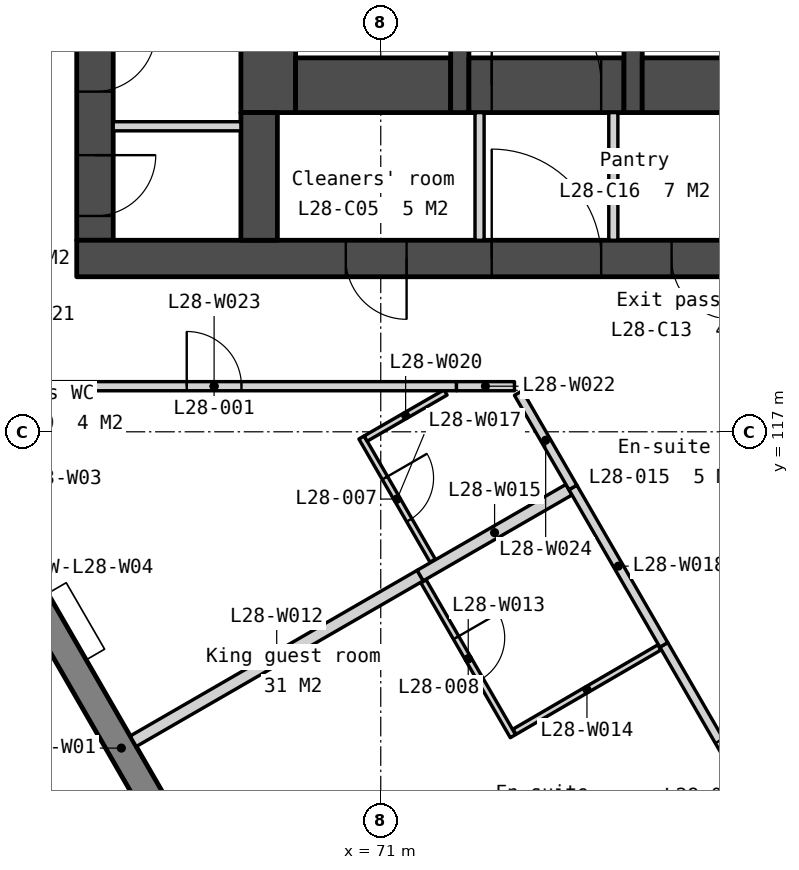
"""IFC4 building model, lengths in metres.
Left out: names, types, materials, properties, quantities, classifications, styles, units other than length and angle.
Written with IfcOpenShell. Run it as: python <this file> out.ifc"""

import sys

from ifc_helpers import new_model, si_unit, direction, frame, frame_2d, origin, place, context, subcontext, project, spatial, polyline, rectangle, outline, extrude, element, fill, save


model = new_model("IFC4")
c1 = context("Model", 3, precision=1e-05, world=origin(), true_north=direction((0.0, 1.0)))
c2 = subcontext(c1, "Body", "Model", "MODEL_VIEW")
j1 = project(units=[si_unit("LENGTHUNIT", "METRE"), si_unit("PLANEANGLEUNIT", "RADIAN")], contexts=[c1])
p1 = place(None, origin())
s1 = spatial("IfcSite", under=j1, at=p1, CompositionType="ELEMENT")
p2 = place(p1, origin())
s2 = spatial("IfcBuilding", under=s1, at=p2, CompositionType="ELEMENT")
p3 = place(p2, frame((0.0, 0.0, 113.3)))
s3 = spatial("IfcBuildingStorey", under=s2, at=p3, CompositionType="ELEMENT", Elevation=113.3)
p4 = place(p3, frame((66.3, 133.95, 0.0), z_axis=(0.0, 0.0, 1.0), x_axis=(0.0, -1.0, 0.0)))
e1 = element("IfcWall", 1, at=p4, inside=s3, PredefinedType="SOLIDWALL", context=c2, shape_type="SweptSolid", body=[
    extrude(rectangle(XDim=13.8, YDim=0.6, at=frame_2d((6.9, 0.0))), origin(), (0.0, 0.0, 1.0), 3.35),
])
p5 = place(p4, frame((0.6, 0.0, 0.0)))
e2 = element("IfcOpeningElement", 2, at=p5, cuts=e1, PredefinedType="OPENING", context=c2, shape_type="SweptSolid", body=[
    extrude(rectangle(XDim=1.1, YDim=2.1, at=frame_2d((0.55, 1.05))), frame((0.0, 0.31, 0.0), z_axis=(0.0, -1.0, 0.0), x_axis=(1.0, 0.0, 0.0)), (0.0, 0.0, 1.0), 0.62),
])
p6 = place(p4, frame((8.405, 0.0, 0.0)))
e3 = element("IfcOpeningElement", 3, at=p6, cuts=e1, PredefinedType="OPENING", context=c2, shape_type="SweptSolid", body=[
    extrude(rectangle(XDim=1.0, YDim=2.1, at=frame_2d((0.5, 1.05))), frame((0.0, 0.31, 0.0), z_axis=(0.0, -1.0, 0.0), x_axis=(1.0, 0.0, 0.0)), (0.0, 0.0, 1.0), 0.62),
])
p7 = place(p4, frame((10.355, 0.0, 0.0)))
e4 = element("IfcOpeningElement", 4, at=p7, cuts=e1, PredefinedType="OPENING", context=c2, shape_type="SweptSolid", body=[
    extrude(rectangle(XDim=1.0, YDim=2.1, at=frame_2d((0.5, 1.05))), frame((0.0, 0.31, 0.0), z_axis=(0.0, -1.0, 0.0), x_axis=(1.0, 0.0, 0.0)), (0.0, 0.0, 1.0), 0.62),
])
p8 = place(p4, frame((12.4, 0.0, 0.0)))
e5 = element("IfcOpeningElement", 5, at=p8, cuts=e1, PredefinedType="OPENING", context=c2, shape_type="SweptSolid", body=[
    extrude(rectangle(XDim=1.0, YDim=2.1, at=frame_2d((0.5, 1.05))), frame((0.0, 0.31, 0.0), z_axis=(0.0, -1.0, 0.0), x_axis=(1.0, 0.0, 0.0)), (0.0, 0.0, 1.0), 0.62),
])
p9 = place(p3, frame((66.0, 119.85, 0.0), z_axis=(0.0, 0.0, 1.0), x_axis=(1.0, 0.0, 0.0)))
e6 = element("IfcWall", 6, at=p9, inside=s3, PredefinedType="SOLIDWALL", context=c2, shape_type="SweptSolid", body=[
    extrude(rectangle(XDim=28.0, YDim=0.6, at=frame_2d((14.0, 0.0))), origin(), (0.0, 0.0, 1.0), 3.35),
])
p10 = place(p9, frame((6.825, 0.0, 0.0)))
e7 = element("IfcOpeningElement", 7, at=p10, cuts=e6, PredefinedType="OPENING", context=c2, shape_type="SweptSolid", body=[
    extrude(rectangle(XDim=1.8, YDim=2.1, at=frame_2d((0.9, 1.05))), frame((0.0, 0.31, 0.0), z_axis=(0.0, -1.0, 0.0), x_axis=(1.0, 0.0, 0.0)), (0.0, 0.0, 1.0), 0.62),
])
p11 = place(p9, frame((15.85, 0.0, 0.0)))
e8 = element("IfcOpeningElement", 8, at=p11, cuts=e6, PredefinedType="OPENING", context=c2, shape_type="SweptSolid", body=[
    extrude(rectangle(XDim=1.5, YDim=2.1, at=frame_2d((0.75, 1.05))), frame((0.0, 0.31, 0.0), z_axis=(0.0, -1.0, 0.0), x_axis=(1.0, 0.0, 0.0)), (0.0, 0.0, 1.0), 0.62),
])
p12 = place(p9, frame((19.375, 0.0, 0.0)))
e9 = element("IfcOpeningElement", 9, at=p12, cuts=e6, PredefinedType="OPENING", context=c2, shape_type="SweptSolid", body=[
    extrude(rectangle(XDim=1.8, YDim=2.1, at=frame_2d((0.9, 1.05))), frame((0.0, 0.31, 0.0), z_axis=(0.0, -1.0, 0.0), x_axis=(1.0, 0.0, 0.0)), (0.0, 0.0, 1.0), 0.62),
])
p13 = place(p9, frame((4.425, 0.0, 0.0)))
e10 = element("IfcOpeningElement", 10, at=p13, cuts=e6, PredefinedType="OPENING", context=c2, shape_type="SweptSolid", body=[
    extrude(rectangle(XDim=1.0, YDim=2.1, at=frame_2d((0.5, 1.05))), frame((0.0, 0.31, 0.0), z_axis=(0.0, -1.0, 0.0), x_axis=(1.0, 0.0, 0.0)), (0.0, 0.0, 1.0), 0.62),
])
p14 = place(p9, frame((9.783, 0.0, 0.0)))
e11 = element("IfcOpeningElement", 11, at=p14, cuts=e6, PredefinedType="OPENING", context=c2, shape_type="SweptSolid", body=[
    extrude(rectangle(XDim=1.0, YDim=2.1, at=frame_2d((0.5, 1.05))), frame((0.0, 0.31, 0.0), z_axis=(0.0, -1.0, 0.0), x_axis=(1.0, 0.0, 0.0)), (0.0, 0.0, 1.0), 0.62),
])
p15 = place(p9, frame((11.525, 0.0, 0.0)))
e12 = element("IfcOpeningElement", 12, at=p15, cuts=e6, PredefinedType="OPENING", context=c2, shape_type="SweptSolid", body=[
    extrude(rectangle(XDim=1.0, YDim=2.1, at=frame_2d((0.5, 1.05))), frame((0.0, 0.31, 0.0), z_axis=(0.0, -1.0, 0.0), x_axis=(1.0, 0.0, 0.0)), (0.0, 0.0, 1.0), 0.62),
])
p16 = place(p9, frame((13.658, 0.0, 0.0)))
e13 = element("IfcOpeningElement", 13, at=p16, cuts=e6, PredefinedType="OPENING", context=c2, shape_type="SweptSolid", body=[
    extrude(rectangle(XDim=1.0, YDim=2.1, at=frame_2d((0.5, 1.05))), frame((0.0, 0.31, 0.0), z_axis=(0.0, -1.0, 0.0), x_axis=(1.0, 0.0, 0.0)), (0.0, 0.0, 1.0), 0.62),
])
p17 = place(p9, frame((21.725, 0.0, 0.0)))
e14 = element("IfcOpeningElement", 14, at=p17, cuts=e6, PredefinedType="OPENING", context=c2, shape_type="SweptSolid", body=[
    extrude(rectangle(XDim=1.0, YDim=2.1, at=frame_2d((0.5, 1.05))), frame((0.0, 0.31, 0.0), z_axis=(0.0, -1.0, 0.0), x_axis=(1.0, 0.0, 0.0)), (0.0, 0.0, 1.0), 0.62),
])
p18 = place(p9, frame((23.425, 0.0, 0.0)))
e15 = element("IfcOpeningElement", 15, at=p18, cuts=e6, PredefinedType="OPENING", context=c2, shape_type="SweptSolid", body=[
    extrude(rectangle(XDim=1.0, YDim=2.1, at=frame_2d((0.5, 1.05))), frame((0.0, 0.31, 0.0), z_axis=(0.0, -1.0, 0.0), x_axis=(1.0, 0.0, 0.0)), (0.0, 0.0, 1.0), 0.62),
])
p19 = place(p3, frame((66.6, 122.025, 0.0), z_axis=(0.0, 0.0, 1.0), x_axis=(1.0, 0.0, 0.0)))
e16 = element("IfcWall", 16, at=p19, inside=s3, PredefinedType="PARTITIONING", context=c2, shape_type="SweptSolid", body=[
    extrude(rectangle(XDim=2.1, YDim=0.15, at=frame_2d((1.05, 0.0))), origin(), (0.0, 0.0, 1.0), 3.35),
])
p20 = place(p3, frame((69.15, 133.95, 0.0), z_axis=(0.0, 0.0, 1.0), x_axis=(0.0, -1.0, 0.0)))
e17 = element("IfcWall", 17, at=p20, inside=s3, PredefinedType="SOLIDWALL", context=c2, shape_type="SweptSolid", body=[
    extrude(rectangle(XDim=11.7, YDim=0.9, at=frame_2d((5.85, 0.0))), origin(), (0.0, 0.0, 1.0), 3.35),
])
p21 = place(p3, frame((69.0, 122.25, 0.0), z_axis=(0.0, 0.0, 1.0), x_axis=(0.0, -1.0, 0.0)))
e18 = element("IfcWall", 18, at=p21, inside=s3, PredefinedType="SOLIDWALL", context=c2, shape_type="SweptSolid", body=[
    extrude(rectangle(XDim=2.1, YDim=0.6, at=frame_2d((1.05, 0.0))), origin(), (0.0, 0.0, 1.0), 3.35),
])
p22 = place(p3, frame((69.6, 122.7, 0.0), z_axis=(0.0, 0.0, 1.0), x_axis=(1.0, 0.0, 0.0)))
e19 = element("IfcWall", 19, at=p22, inside=s3, PredefinedType="SOLIDWALL", context=c2, shape_type="SweptSolid", body=[
    extrude(rectangle(XDim=2.55, YDim=0.9, at=frame_2d((1.275, 0.0))), origin(), (0.0, 0.0, 1.0), 3.35),
])
p23 = place(p3, frame((72.3, 133.95, 0.0), z_axis=(0.0, 0.0, 1.0), x_axis=(0.0, -1.0, 0.0)))
e20 = element("IfcWall", 20, at=p23, inside=s3, PredefinedType="SOLIDWALL", context=c2, shape_type="SweptSolid", body=[
    extrude(rectangle(XDim=11.7, YDim=0.3, at=frame_2d((5.85, 0.0))), origin(), (0.0, 0.0, 1.0), 3.35),
])
p24 = place(p23, frame((6.95, 0.0, 0.0)))
e21 = element("IfcOpeningElement", 21, at=p24, cuts=e20, PredefinedType="OPENING", context=c2, shape_type="SweptSolid", body=[
    extrude(rectangle(XDim=1.1, YDim=2.1, at=frame_2d((0.55, 1.05))), frame((0.0, 0.16, 0.0), z_axis=(0.0, -1.0, 0.0), x_axis=(1.0, 0.0, 0.0)), (0.0, 0.0, 1.0), 0.32),
])
p25 = place(p23, frame((9.35, 0.0, 0.0)))
e22 = element("IfcOpeningElement", 22, at=p25, cuts=e20, PredefinedType="OPENING", context=c2, shape_type="SweptSolid", body=[
    extrude(rectangle(XDim=0.9, YDim=2.1, at=frame_2d((0.45, 1.05))), frame((0.0, 0.16, 0.0), z_axis=(0.0, -1.0, 0.0), x_axis=(1.0, 0.0, 0.0)), (0.0, 0.0, 1.0), 0.32),
])
p26 = place(p23, frame((5.1, 0.0, 0.0)))
e23 = element("IfcOpeningElement", 23, at=p26, cuts=e20, PredefinedType="OPENING", context=c2, shape_type="SweptSolid", body=[
    extrude(rectangle(XDim=1.0, YDim=2.1, at=frame_2d((0.5, 1.05))), frame((0.0, 0.16, 0.0), z_axis=(0.0, -1.0, 0.0), x_axis=(1.0, 0.0, 0.0)), (0.0, 0.0, 1.0), 0.32),
])
p27 = place(p3, frame((72.45, 122.7, 0.0), z_axis=(0.0, 0.0, 1.0), x_axis=(1.0, 0.0, 0.0)))
e24 = element("IfcWall", 24, at=p27, inside=s3, PredefinedType="SOLIDWALL", context=c2, shape_type="SweptSolid", body=[
    extrude(rectangle(XDim=2.55, YDim=0.9, at=frame_2d((1.275, 0.0))), origin(), (0.0, 0.0, 1.0), 3.35),
])
p28 = place(p27, frame((0.375, 0.0, 0.0)))
e25 = element("IfcOpeningElement", 25, at=p28, cuts=e24, PredefinedType="OPENING", context=c2, shape_type="SweptSolid", body=[
    extrude(rectangle(XDim=1.8, YDim=2.1, at=frame_2d((0.9, 1.05))), frame((0.0, 0.46, 0.0), z_axis=(0.0, -1.0, 0.0), x_axis=(1.0, 0.0, 0.0)), (0.0, 0.0, 1.0), 0.92),
])
for number, where, z_axis, x_axis in (
    (26, (72.625, 122.25, 0.0), (0.0, 0.0, 1.0), (0.0, -1.0, 0.0)),
    (27, (74.825, 122.25, 0.0), (0.0, 0.0, 1.0), (0.0, -1.0, 0.0)),
):
    element("IfcWall", number, at=place(p3, frame(where, z_axis=z_axis, x_axis=x_axis)), inside=s3, PredefinedType="PARTITIONING", context=c2, shape_type="SweptSolid", body=[
        extrude(rectangle(XDim=2.1, YDim=0.15, at=frame_2d((1.05, 0.0))), origin(), (0.0, 0.0, 1.0), 3.35),
    ])
p29 = place(p3, frame((75.15, 133.95, 0.0), z_axis=(0.0, 0.0, 1.0), x_axis=(0.0, -1.0, 0.0)))
e28 = element("IfcWall", 28, at=p29, inside=s3, PredefinedType="SOLIDWALL", context=c2, shape_type="SweptSolid", body=[
    extrude(rectangle(XDim=11.7, YDim=0.3, at=frame_2d((5.85, 0.0))), origin(), (0.0, 0.0, 1.0), 3.35),
])
p30 = place(p3, frame((75.3, 122.7, 0.0), z_axis=(0.0, 0.0, 1.0), x_axis=(1.0, 0.0, 0.0)))
e29 = element("IfcWall", 29, at=p30, inside=s3, PredefinedType="SOLIDWALL", context=c2, shape_type="SweptSolid", body=[
    extrude(rectangle(XDim=6.2, YDim=0.9, at=frame_2d((3.1, 0.0))), origin(), (0.0, 0.0, 1.0), 3.35),
])
p31 = place(p3, frame((56.073, 130.263, -0.15), z_axis=(0.0, 0.0, 1.0), x_axis=(0.500000478905, -0.866025127289, 0.0)))
e30 = element("IfcWall", 30, at=p31, inside=s3, PredefinedType="SOLIDWALL", context=c2, shape_type="SweptSolid", body=[
    extrude(outline(polyline([(42.643, 0.0), (42.643, 3.5), (0.0, 3.5), (0.0, 0.0), (42.643, 0.0)])), frame((0.0, 0.225, 0.0), z_axis=(0.0, -1.0, 0.0), x_axis=(1.0, 0.0, 0.0)), (0.0, 0.0, 1.0), 0.45),
])
p32 = place(p31, frame((7.079, 0.0, 1.05)))
e31 = element("IfcOpeningElement", 31, at=p32, cuts=e30, PredefinedType="OPENING", context=c2, shape_type="SweptSolid", body=[
    extrude(rectangle(XDim=1.2, YDim=1.5, at=frame_2d((0.6, 0.75))), frame((0.0, 0.235, 0.0), z_axis=(0.0, -1.0, 0.0), x_axis=(1.0, 0.0, 0.0)), (0.0, 0.0, 1.0), 0.47),
])
p33 = place(p31, frame((8.779, 0.0, 1.05)))
e32 = element("IfcOpeningElement", 32, at=p33, cuts=e30, PredefinedType="OPENING", context=c2, shape_type="SweptSolid", body=[
    extrude(rectangle(XDim=1.2, YDim=1.5, at=frame_2d((0.6, 0.75))), frame((0.0, 0.235, 0.0), z_axis=(0.0, -1.0, 0.0), x_axis=(1.0, 0.0, 0.0)), (0.0, 0.0, 1.0), 0.47),
])
p34 = place(p31, frame((15.607, 0.0, 1.05)))
e33 = element("IfcOpeningElement", 33, at=p34, cuts=e30, PredefinedType="OPENING", context=c2, shape_type="SweptSolid", body=[
    extrude(rectangle(XDim=1.2, YDim=1.5, at=frame_2d((0.6, 0.75))), frame((0.0, 0.235, 0.0), z_axis=(0.0, -1.0, 0.0), x_axis=(1.0, 0.0, 0.0)), (0.0, 0.0, 1.0), 0.47),
])
p35 = place(p31, frame((17.307, 0.0, 1.05)))
e34 = element("IfcOpeningElement", 34, at=p35, cuts=e30, PredefinedType="OPENING", context=c2, shape_type="SweptSolid", body=[
    extrude(rectangle(XDim=1.2, YDim=1.5, at=frame_2d((0.6, 0.75))), frame((0.0, 0.235, 0.0), z_axis=(0.0, -1.0, 0.0), x_axis=(1.0, 0.0, 0.0)), (0.0, 0.0, 1.0), 0.47),
])
p36 = place(p31, frame((24.136, 0.0, 1.05)))
e35 = element("IfcOpeningElement", 35, at=p36, cuts=e30, PredefinedType="OPENING", context=c2, shape_type="SweptSolid", body=[
    extrude(rectangle(XDim=1.2, YDim=1.5, at=frame_2d((0.6, 0.75))), frame((0.0, 0.235, 0.0), z_axis=(0.0, -1.0, 0.0), x_axis=(1.0, 0.0, 0.0)), (0.0, 0.0, 1.0), 0.47),
])
p37 = place(p31, frame((25.836, 0.0, 1.05)))
e36 = element("IfcOpeningElement", 36, at=p37, cuts=e30, PredefinedType="OPENING", context=c2, shape_type="SweptSolid", body=[
    extrude(rectangle(XDim=1.2, YDim=1.5, at=frame_2d((0.6, 0.75))), frame((0.0, 0.235, 0.0), z_axis=(0.0, -1.0, 0.0), x_axis=(1.0, 0.0, 0.0)), (0.0, 0.0, 1.0), 0.47),
])
p38 = place(p31, frame((32.665, 0.0, 1.05)))
e37 = element("IfcOpeningElement", 37, at=p38, cuts=e30, PredefinedType="OPENING", context=c2, shape_type="SweptSolid", body=[
    extrude(rectangle(XDim=1.2, YDim=1.5, at=frame_2d((0.6, 0.75))), frame((0.0, 0.235, 0.0), z_axis=(0.0, -1.0, 0.0), x_axis=(1.0, 0.0, 0.0)), (0.0, 0.0, 1.0), 0.47),
])
p39 = place(p31, frame((34.365, 0.0, 1.05)))
e38 = element("IfcOpeningElement", 38, at=p39, cuts=e30, PredefinedType="OPENING", context=c2, shape_type="SweptSolid", body=[
    extrude(rectangle(XDim=1.2, YDim=1.5, at=frame_2d((0.6, 0.75))), frame((0.0, 0.235, 0.0), z_axis=(0.0, -1.0, 0.0), x_axis=(1.0, 0.0, 0.0)), (0.0, 0.0, 1.0), 0.47),
])
p40 = place(p3, frame((75.655, 113.496, 0.0), z_axis=(0.0, 0.0, 1.0), x_axis=(0.499986163319, -0.866033392248, 0.0)))
e39 = element("IfcWall", 39, at=p40, inside=s3, PredefinedType="PARTITIONING", context=c2, shape_type="SweptSolid", body=[
    extrude(rectangle(XDim=4.648, YDim=0.15, at=frame_2d((2.324, 0.0))), origin(), (0.0, 0.0, 1.0), 3.35),
])
p41 = place(p40, frame((1.824, 0.0, 0.0)))
e40 = element("IfcOpeningElement", 40, at=p41, cuts=e39, PredefinedType="OPENING", context=c2, shape_type="SweptSolid", body=[
    extrude(rectangle(XDim=1.0, YDim=2.1, at=frame_2d((0.5, 1.05))), frame((0.0, 0.085, 0.0), z_axis=(0.0, -1.0, 0.0), x_axis=(1.0, 0.0, 0.0)), (0.0, 0.0, 1.0), 0.17),
])
p42 = place(p3, frame((66.929, 111.91, 0.0), z_axis=(0.0, 0.0, 1.0), x_axis=(0.866012511928, 0.500022328685, 0.0)))
e41 = element("IfcWall", 41, at=p42, inside=s3, PredefinedType="PARTITIONING", context=c2, shape_type="SweptSolid", body=[
    extrude(rectangle(XDim=5.45, YDim=0.2, at=frame_2d((2.725, 0.0))), origin(), (0.0, 0.0, 1.0), 3.35),
])
p43 = place(p3, frame((71.704, 114.54, 0.0), z_axis=(0.0, 0.0, 1.0), x_axis=(0.499988418424, -0.866032090307, 0.0)))
e42 = element("IfcWall", 42, at=p43, inside=s3, PredefinedType="PARTITIONING", context=c2, shape_type="SweptSolid", body=[
    extrude(rectangle(XDim=2.94, YDim=0.1, at=frame_2d((1.47, 0.0))), origin(), (0.0, 0.0, 1.0), 3.35),
])
p44 = place(p43, frame((1.07, 0.0, 0.0)))
e43 = element("IfcOpeningElement", 43, at=p44, cuts=e42, PredefinedType="OPENING", context=c2, shape_type="SweptSolid", body=[
    extrude(rectangle(XDim=0.8, YDim=2.1, at=frame_2d((0.4, 1.05))), frame((0.0, 0.06, 0.0), z_axis=(0.0, -1.0, 0.0), x_axis=(1.0, 0.0, 0.0)), (0.0, 0.0, 1.0), 0.12),
])
p45 = place(p3, frame((73.201, 112.067, 0.0), z_axis=(0.0, 0.0, 1.0), x_axis=(0.8642895013, 0.502994689775, 0.0)))
e44 = element("IfcWall", 44, at=p45, inside=s3, PredefinedType="PARTITIONING", context=c2, shape_type="SweptSolid", body=[
    extrude(rectangle(XDim=2.755, YDim=0.1, at=frame_2d((1.377, 0.0))), origin(), (0.0, 0.0, 1.0), 3.35),
])
p46 = place(p3, frame((71.649, 114.635, 0.0), z_axis=(0.0, 0.0, 1.0), x_axis=(0.866011447264, 0.500024172624, 0.0)))
e45 = element("IfcWall", 45, at=p46, inside=s3, PredefinedType="PARTITIONING", context=c2, shape_type="SweptSolid", body=[
    extrude(rectangle(XDim=2.825, YDim=0.2, at=frame_2d((1.413, 0.0))), origin(), (0.0, 0.0, 1.0), 3.35),
])
p47 = place(p3, frame((70.684, 116.907, 0.0), z_axis=(0.0, 0.0, 1.0), x_axis=(0.499999433879, -0.866025730634, 0.0)))
e46 = element("IfcWall", 46, at=p47, inside=s3, PredefinedType="PARTITIONING", context=c2, shape_type="SweptSolid", body=[
    extrude(rectangle(XDim=2.34, YDim=0.1, at=frame_2d((1.17, 0.0))), origin(), (0.0, 0.0, 1.0), 3.35),
])
p48 = place(p47, frame((0.77, 0.0, 0.0)))
e47 = element("IfcOpeningElement", 47, at=p48, cuts=e46, PredefinedType="OPENING", context=c2, shape_type="SweptSolid", body=[
    extrude(rectangle(XDim=0.8, YDim=2.1, at=frame_2d((0.4, 1.05))), frame((0.0, 0.06, 0.0), z_axis=(0.0, -1.0, 0.0), x_axis=(1.0, 0.0, 0.0)), (0.0, 0.0, 1.0), 0.12),
])
p49 = place(p3, frame((74.16, 116.085, 0.0), z_axis=(0.0, 0.0, 1.0), x_axis=(0.500038154266, -0.866003374288, 0.0)))
e48 = element("IfcWall", 48, at=p49, inside=s3, PredefinedType="PARTITIONING", context=c2, shape_type="SweptSolid", body=[
    extrude(rectangle(XDim=2.99, YDim=0.15, at=frame_2d((1.495, 0.0))), origin(), (0.0, 0.0, 1.0), 3.35),
])
p50 = place(p3, frame((70.752, 116.889, 0.0), z_axis=(0.0, 0.0, 1.0), x_axis=(0.866016800201, 0.500014901547, 0.0)))
e49 = element("IfcWall", 49, at=p50, inside=s3, PredefinedType="PARTITIONING", context=c2, shape_type="SweptSolid", body=[
    extrude(rectangle(XDim=1.518, YDim=0.1, at=frame_2d((0.759, 0.0))), origin(), (0.0, 0.0, 1.0), 3.35),
])
p51 = place(p3, frame((72.244, 117.75, 0.0), z_axis=(0.0, 0.0, 1.0), x_axis=(1.0, 0.0, 0.0)))
e50 = element("IfcWall", 50, at=p51, inside=s3, PredefinedType="PARTITIONING", context=c2, shape_type="SweptSolid", body=[
    extrude(rectangle(XDim=0.956, YDim=0.15, at=frame_2d((0.478, 0.0))), origin(), (0.0, 0.0, 1.0), 3.35),
])
p52 = place(p3, frame((64.275, 117.75, 0.0), z_axis=(0.0, 0.0, 1.0), x_axis=(1.0, 0.0, 0.0)))
e51 = element("IfcWall", 51, at=p52, inside=s3, PredefinedType="PARTITIONING", context=c2, shape_type="SweptSolid", body=[
    extrude(rectangle(XDim=7.969, YDim=0.15, at=frame_2d((3.984, 0.0))), origin(), (0.0, 0.0, 1.0), 3.35),
])
p53 = place(p52, frame((3.534, 0.0, 0.0)))
e52 = element("IfcOpeningElement", 52, at=p53, cuts=e51, PredefinedType="OPENING", context=c2, shape_type="SweptSolid", body=[
    extrude(rectangle(XDim=0.9, YDim=2.1, at=frame_2d((0.45, 1.05))), frame((0.0, 0.085, 0.0), z_axis=(0.0, -1.0, 0.0), x_axis=(1.0, 0.0, 0.0)), (0.0, 0.0, 1.0), 0.17),
])
p54 = place(p3, frame((73.264, 117.637, 0.0), z_axis=(0.0, 0.0, 1.0), x_axis=(0.499918981156, -0.866072174983, 0.0)))
e53 = element("IfcWall", 53, at=p54, inside=s3, PredefinedType="PARTITIONING", context=c2, shape_type="SweptSolid", body=[
    extrude(rectangle(XDim=1.792, YDim=0.15, at=frame_2d((0.896, 0.0))), origin(), (0.0, 0.0, 1.0), 3.35),
])
p55 = place(p28, origin())
e54 = element("IfcDoor", 54, at=p55, inside=s3, OperationType="DOUBLE_DOOR_DOUBLE_SWING", PredefinedType="DOOR", context=c2, shape_type="SweptSolid", body=[
    extrude(rectangle(XDim=1.8, YDim=2.1, at=frame_2d((0.9, 1.05))), frame((0.0, 0.025, 0.0), z_axis=(0.0, -1.0, 0.0), x_axis=(1.0, 0.0, 0.0)), (0.0, 0.0, 1.0), 0.05),
])
fill(e25, e54)
p56 = place(p10, origin())
e55 = element("IfcDoor", 55, at=p56, inside=s3, OperationType="DOUBLE_DOOR_DOUBLE_SWING", PredefinedType="DOOR", context=c2, shape_type="SweptSolid", body=[
    extrude(rectangle(XDim=1.8, YDim=2.1, at=frame_2d((0.9, 1.05))), frame((0.0, 0.025, 0.0), z_axis=(0.0, -1.0, 0.0), x_axis=(1.0, 0.0, 0.0)), (0.0, 0.0, 1.0), 0.05),
])
fill(e7, e55)
p57 = place(p13, origin())
e56 = element("IfcDoor", 56, at=p57, inside=s3, OperationType="SINGLE_SWING_RIGHT", PredefinedType="DOOR", context=c2, shape_type="SweptSolid", body=[
    extrude(rectangle(XDim=1.0, YDim=2.1, at=frame_2d((0.5, 1.05))), frame((0.0, 0.025, 0.0), z_axis=(0.0, -1.0, 0.0), x_axis=(1.0, 0.0, 0.0)), (0.0, 0.0, 1.0), 0.05),
])
fill(e10, e56)
p58 = place(p14, origin())
e57 = element("IfcDoor", 57, at=p58, inside=s3, OperationType="SINGLE_SWING_RIGHT", PredefinedType="DOOR", context=c2, shape_type="SweptSolid", body=[
    extrude(rectangle(XDim=1.0, YDim=2.1, at=frame_2d((0.5, 1.05))), frame((0.0, 0.025, 0.0), z_axis=(0.0, -1.0, 0.0), x_axis=(1.0, 0.0, 0.0)), (0.0, 0.0, 1.0), 0.05),
])
fill(e11, e57)
p59 = place(p7, origin())
e58 = element("IfcDoor", 58, at=p59, inside=s3, OperationType="SINGLE_SWING_LEFT", PredefinedType="DOOR", context=c2, shape_type="SweptSolid", body=[
    extrude(rectangle(XDim=1.0, YDim=2.1, at=frame_2d((0.5, 1.05))), frame((0.0, 0.025, 0.0), z_axis=(0.0, -1.0, 0.0), x_axis=(1.0, 0.0, 0.0)), (0.0, 0.0, 1.0), 0.05),
])
fill(e4, e58)
p60 = place(p8, origin())
e59 = element("IfcDoor", 59, at=p60, inside=s3, OperationType="SINGLE_SWING_LEFT", PredefinedType="DOOR", context=c2, shape_type="SweptSolid", body=[
    extrude(rectangle(XDim=1.0, YDim=2.1, at=frame_2d((0.5, 1.05))), frame((0.0, 0.025, 0.0), z_axis=(0.0, -1.0, 0.0), x_axis=(1.0, 0.0, 0.0)), (0.0, 0.0, 1.0), 0.05),
])
fill(e5, e59)
p61 = place(p53, origin())
e60 = element("IfcDoor", 60, at=p61, inside=s3, OperationType="SINGLE_SWING_LEFT", PredefinedType="DOOR", context=c2, shape_type="SweptSolid", body=[
    extrude(rectangle(XDim=0.9, YDim=2.1, at=frame_2d((0.45, 1.05))), frame((0.0, 0.025, 0.0), z_axis=(0.0, -1.0, 0.0), x_axis=(1.0, 0.0, 0.0)), (0.0, 0.0, 1.0), 0.05),
])
fill(e52, e60)
p62 = place(p41, origin())
e61 = element("IfcDoor", 61, at=p62, inside=s3, OperationType="SINGLE_SWING_LEFT", PredefinedType="DOOR", context=c2, shape_type="SweptSolid", body=[
    extrude(rectangle(XDim=1.0, YDim=2.1, at=frame_2d((0.5, 1.05))), frame((0.0, 0.025, 0.0), z_axis=(0.0, -1.0, 0.0), x_axis=(1.0, 0.0, 0.0)), (0.0, 0.0, 1.0), 0.05),
])
fill(e40, e61)
p63 = place(p48, origin())
e62 = element("IfcDoor", 62, at=p63, inside=s3, OperationType="SINGLE_SWING_LEFT", PredefinedType="DOOR", context=c2, shape_type="SweptSolid", body=[
    extrude(rectangle(XDim=0.8, YDim=2.1, at=frame_2d((0.4, 1.05))), frame((0.0, 0.025, 0.0), z_axis=(0.0, -1.0, 0.0), x_axis=(1.0, 0.0, 0.0)), (0.0, 0.0, 1.0), 0.05),
])
fill(e47, e62)
p64 = place(p44, origin())
e63 = element("IfcDoor", 63, at=p64, inside=s3, OperationType="SINGLE_SWING_LEFT", PredefinedType="DOOR", context=c2, shape_type="SweptSolid", body=[
    extrude(rectangle(XDim=0.8, YDim=2.1, at=frame_2d((0.4, 1.05))), frame((0.0, 0.025, 0.0), z_axis=(0.0, -1.0, 0.0), x_axis=(1.0, 0.0, 0.0)), (0.0, 0.0, 1.0), 0.05),
])
fill(e43, e63)
save(model, sys.argv[1])
